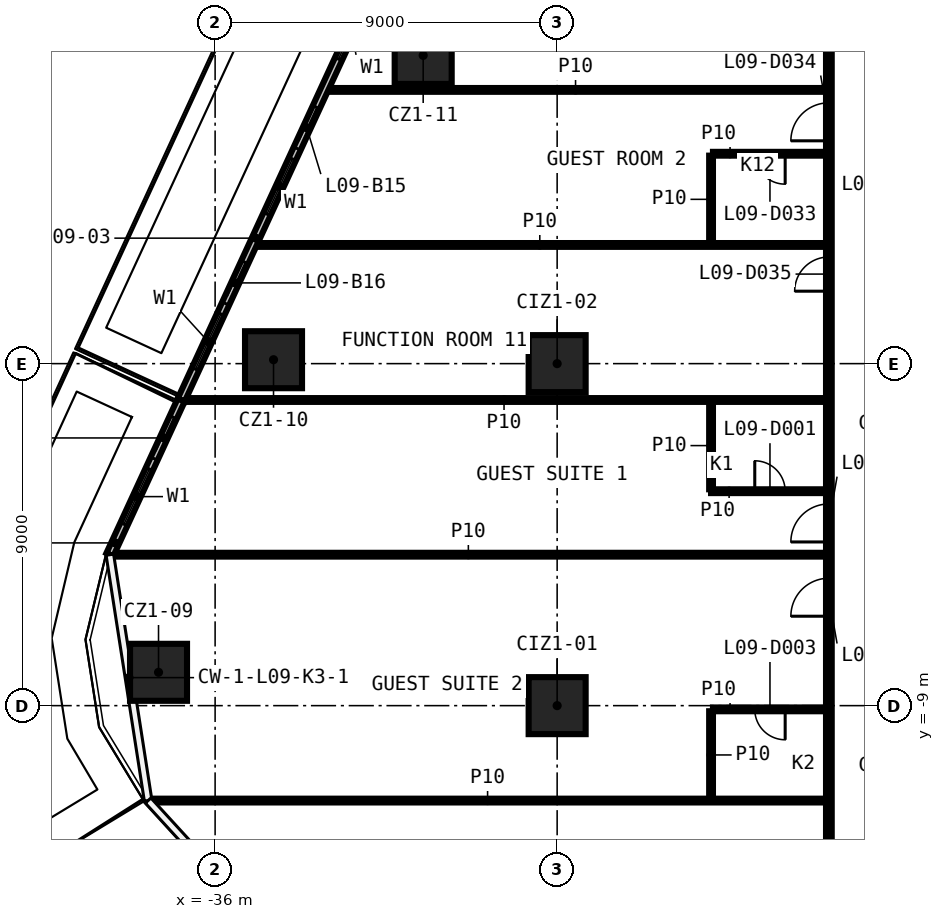
"""IFC4 building model, lengths in metres.
Left out: names, types, materials, properties, quantities, classifications, styles, units other than length and angle.
Written with IfcOpenShell. Run it as: python <this file> out.ifc"""

import sys

from ifc_helpers import new_model, si_unit, direction, frame, frame_2d, origin, origin_2d, place, context, subcontext, project, spatial, rectangle, extrude, element, fill, save


model = new_model("IFC4")
c1 = context("Model", 3, precision=1e-05, world=origin(), true_north=direction((0.0, 1.0)))
c2 = subcontext(c1, "Body", "Model", "MODEL_VIEW")
j1 = project(units=[si_unit("LENGTHUNIT", "METRE"), si_unit("PLANEANGLEUNIT", "RADIAN")], contexts=[c1])
p1 = place(None, origin())
s1 = spatial("IfcSite", under=j1, at=p1, CompositionType="ELEMENT")
p2 = place(p1, origin())
s2 = spatial("IfcBuilding", under=s1, at=p2, CompositionType="ELEMENT")
p3 = place(p2, frame((0.0, 0.0, 55.1)))
s3 = spatial("IfcBuildingStorey", under=s2, at=p3, CompositionType="ELEMENT", Elevation=55.1)
for number, where, z_axis, x_axis in (
    (1, (-37.489, -8.123, 0.0), (0.0, 0.0, 1.0), (1.0, 0.0, 0.0)),
    (2, (-34.463, 0.103, 0.0), (0.0, 0.0, 1.0), (1.0, 0.0, 0.0)),
    (3, (-30.525, 8.111, 0.0), (0.0, 0.0, 1.0), (1.0, 0.0, 0.0)),
    (4, (-27.0, -9.0, 0.0), (0.0, 0.0, 1.0), (1.0, 0.0, 0.0)),
    (5, (-27.0, 0.0, 0.0), (0.0, 0.0, 1.0), (1.0, 0.0, 0.0)),
):
    element("IfcColumn", number, at=place(p3, frame(where, z_axis=z_axis, x_axis=x_axis)), inside=s3, PredefinedType="COLUMN", context=c2, shape_type="SweptSolid", body=[
        extrude(rectangle(XDim=1.5, YDim=1.5, at=origin_2d()), origin(), (0.0, 0.0, 1.0), 3.3),
    ])
p4 = place(p3, frame((-37.736, -11.498, 0.0), z_axis=(0.0, 0.0, 1.0), x_axis=(1.0, 0.0, 0.0)))
e6 = element("IfcWall", 6, at=p4, inside=s3, PredefinedType="PARTITIONING", context=c2, shape_type="SweptSolid", body=[
    extrude(rectangle(XDim=17.811, YDim=0.1, at=frame_2d((8.905, 0.0))), origin(), (0.0, 0.0, 1.0), 3.3),
])
p5 = place(p3, frame((-19.925, -9.098, 0.0), z_axis=(0.0, 0.0, 1.0), x_axis=(-1.0, 0.0, 0.0)))
e7 = element("IfcWall", 7, at=p5, inside=s3, PredefinedType="PARTITIONING", context=c2, shape_type="SweptSolid", body=[
    extrude(rectangle(XDim=2.975, YDim=0.1, at=frame_2d((1.487, 0.0))), origin(), (0.0, 0.0, 1.0), 3.3),
])
p6 = place(p5, frame((1.075, 0.0, 0.0)))
e8 = element("IfcOpeningElement", 8, at=p6, cuts=e7, PredefinedType="OPENING", context=c2, shape_type="SweptSolid", body=[
    extrude(rectangle(XDim=0.8, YDim=2.1, at=frame_2d((0.4, 1.05))), frame((0.0, 0.06, 0.0), z_axis=(0.0, -1.0, 0.0), x_axis=(1.0, 0.0, 0.0)), (0.0, 0.0, 1.0), 0.12),
])
p7 = place(p3, frame((-38.748, -5.028, 0.0), z_axis=(0.0, 0.0, 1.0), x_axis=(1.0, 0.0, 0.0)))
e9 = element("IfcWall", 9, at=p7, inside=s3, PredefinedType="PARTITIONING", context=c2, shape_type="SweptSolid", body=[
    extrude(rectangle(XDim=18.823, YDim=0.1, at=frame_2d((9.411, 0.0))), origin(), (0.0, 0.0, 1.0), 3.3),
])
p8 = place(p3, frame((-22.95, -3.357, 0.0), z_axis=(0.0, 0.0, 1.0), x_axis=(1.0, 0.0, 0.0)))
e10 = element("IfcWall", 10, at=p8, inside=s3, PredefinedType="PARTITIONING", context=c2, shape_type="SweptSolid", body=[
    extrude(rectangle(XDim=3.025, YDim=0.1, at=frame_2d((1.512, 0.0))), origin(), (0.0, 0.0, 1.0), 3.3),
])
p9 = place(p8, frame((1.15, 0.0, 0.0)))
e11 = element("IfcOpeningElement", 11, at=p9, cuts=e10, PredefinedType="OPENING", context=c2, shape_type="SweptSolid", body=[
    extrude(rectangle(XDim=0.8, YDim=2.1, at=frame_2d((0.4, 1.05))), frame((0.0, 0.06, 0.0), z_axis=(0.0, -1.0, 0.0), x_axis=(1.0, 0.0, 0.0)), (0.0, 0.0, 1.0), 0.12),
])
p10 = place(p3, frame((-36.87, -0.957, 0.0), z_axis=(0.0, 0.0, 1.0), x_axis=(1.0, 0.0, 0.0)))
e12 = element("IfcWall", 12, at=p10, inside=s3, PredefinedType="PARTITIONING", context=c2, shape_type="SweptSolid", body=[
    extrude(rectangle(XDim=16.945, YDim=0.1, at=frame_2d((8.472, 0.0))), origin(), (0.0, 0.0, 1.0), 3.3),
])
p11 = place(p3, frame((-34.988, 3.123, 0.0), z_axis=(0.0, 0.0, 1.0), x_axis=(1.0, 0.0, 0.0)))
e13 = element("IfcWall", 13, at=p11, inside=s3, PredefinedType="PARTITIONING", context=c2, shape_type="SweptSolid", body=[
    extrude(rectangle(XDim=15.063, YDim=0.1, at=frame_2d((7.531, 0.0))), origin(), (0.0, 0.0, 1.0), 3.3),
])
p12 = place(p3, frame((-19.925, 5.523, 0.0), z_axis=(0.0, 0.0, 1.0), x_axis=(-1.0, 0.0, 0.0)))
e14 = element("IfcWall", 14, at=p12, inside=s3, PredefinedType="PARTITIONING", context=c2, shape_type="SweptSolid", body=[
    extrude(rectangle(XDim=2.975, YDim=0.1, at=frame_2d((1.487, 0.0))), origin(), (0.0, 0.0, 1.0), 3.3),
])
p13 = place(p12, frame((1.075, 0.0, 0.0)))
e15 = element("IfcOpeningElement", 15, at=p13, cuts=e14, PredefinedType="OPENING", context=c2, shape_type="SweptSolid", body=[
    extrude(rectangle(XDim=0.8, YDim=2.1, at=frame_2d((0.4, 1.05))), frame((0.0, 0.06, 0.0), z_axis=(0.0, -1.0, 0.0), x_axis=(1.0, 0.0, 0.0)), (0.0, 0.0, 1.0), 0.12),
])
p14 = place(p3, frame((-33.106, 7.203, 0.0), z_axis=(0.0, 0.0, 1.0), x_axis=(1.0, 0.0, 0.0)))
e16 = element("IfcWall", 16, at=p14, inside=s3, PredefinedType="PARTITIONING", context=c2, shape_type="SweptSolid", body=[
    extrude(rectangle(XDim=13.181, YDim=0.1, at=frame_2d((6.591, 0.0))), origin(), (0.0, 0.0, 1.0), 3.3),
])
p15 = place(p3, frame((-19.85, -16.775, 0.0), z_axis=(0.0, 0.0, 1.0), x_axis=(0.0, 1.0, 0.0)))
e17 = element("IfcWall", 17, at=p15, inside=s3, PredefinedType="PARTITIONING", context=c2, shape_type="SweptSolid", body=[
    extrude(rectangle(XDim=33.55, YDim=0.15, at=frame_2d((16.775, 0.0))), origin(), (0.0, 0.0, 1.0), 3.3),
])
p16 = place(p15, frame((12.083, 0.0, 0.0)))
e18 = element("IfcOpeningElement", 18, at=p16, cuts=e17, PredefinedType="OPENING", context=c2, shape_type="SweptSolid", body=[
    extrude(rectangle(XDim=1.0, YDim=2.1, at=frame_2d((0.5, 1.05))), frame((0.0, 0.085, 0.0), z_axis=(0.0, -1.0, 0.0), x_axis=(1.0, 0.0, 0.0)), (0.0, 0.0, 1.0), 0.17),
])
p17 = place(p15, frame((10.128, 0.0, 0.0)))
e19 = element("IfcOpeningElement", 19, at=p17, cuts=e17, PredefinedType="OPENING", context=c2, shape_type="SweptSolid", body=[
    extrude(rectangle(XDim=1.0, YDim=2.1, at=frame_2d((0.5, 1.05))), frame((0.0, 0.085, 0.0), z_axis=(0.0, -1.0, 0.0), x_axis=(1.0, 0.0, 0.0)), (0.0, 0.0, 1.0), 0.17),
])
p18 = place(p15, frame((3.259, 0.0, 0.0)))
e20 = element("IfcOpeningElement", 20, at=p18, cuts=e17, PredefinedType="OPENING", context=c2, shape_type="SweptSolid", body=[
    extrude(rectangle(XDim=0.9, YDim=2.1, at=frame_2d((0.45, 1.05))), frame((0.0, 0.085, 0.0), z_axis=(0.0, -1.0, 0.0), x_axis=(1.0, 0.0, 0.0)), (0.0, 0.0, 1.0), 0.17),
])
p19 = place(p15, frame((30.799, 0.0, 0.0)))
e21 = element("IfcOpeningElement", 21, at=p19, cuts=e17, PredefinedType="OPENING", context=c2, shape_type="SweptSolid", body=[
    extrude(rectangle(XDim=1.0, YDim=2.1, at=frame_2d((0.5, 1.05))), frame((0.0, 0.085, 0.0), z_axis=(0.0, -1.0, 0.0), x_axis=(1.0, 0.0, 0.0)), (0.0, 0.0, 1.0), 0.17),
])
p20 = place(p15, frame((22.638, 0.0, 0.0)))
e22 = element("IfcOpeningElement", 22, at=p20, cuts=e17, PredefinedType="OPENING", context=c2, shape_type="SweptSolid", body=[
    extrude(rectangle(XDim=1.0, YDim=2.1, at=frame_2d((0.5, 1.05))), frame((0.0, 0.085, 0.0), z_axis=(0.0, -1.0, 0.0), x_axis=(1.0, 0.0, 0.0)), (0.0, 0.0, 1.0), 0.17),
])
p21 = place(p15, frame((18.681, 0.0, 0.0)))
e23 = element("IfcOpeningElement", 23, at=p21, cuts=e17, PredefinedType="OPENING", context=c2, shape_type="SweptSolid", body=[
    extrude(rectangle(XDim=0.9, YDim=2.1, at=frame_2d((0.45, 1.05))), frame((0.0, 0.085, 0.0), z_axis=(0.0, -1.0, 0.0), x_axis=(1.0, 0.0, 0.0)), (0.0, 0.0, 1.0), 0.17),
])
for number, where, z_axis, x_axis in (
    (24, (-22.95, -11.448, 0.0), (0.0, 0.0, 1.0), (0.0, 1.0, 0.0)),
    (25, (-22.95, -3.307, 0.0), (0.0, 0.0, 1.0), (0.0, 1.0, 0.0)),
):
    element("IfcWall", number, at=place(p3, frame(where, z_axis=z_axis, x_axis=x_axis)), inside=s3, PredefinedType="PARTITIONING", context=c2, shape_type="SweptSolid", body=[
        extrude(rectangle(XDim=2.3, YDim=0.1, at=frame_2d((1.15, 0.0))), origin(), (0.0, 0.0, 1.0), 3.3),
    ])
p22 = place(p3, frame((-22.95, 3.173, 0.0), z_axis=(0.0, 0.0, 1.0), x_axis=(0.0, 1.0, 0.0)))
e26 = element("IfcWall", 26, at=p22, inside=s3, PredefinedType="PARTITIONING", context=c2, shape_type="SweptSolid", body=[
    extrude(rectangle(XDim=2.3, YDim=0.1, at=frame_2d((1.15, 0.0))), origin(), (0.0, 0.0, 1.0), 3.3),
])
p23 = place(p3, frame((-25.601, 23.524, 0.0), z_axis=(0.0, 0.0, 1.0), x_axis=(-0.418809499218, -0.908074117771, 0.0)))
e27 = element("IfcWall", 27, at=p23, inside=s3, PredefinedType="SOLIDWALL", context=c2, shape_type="SweptSolid", body=[
    extrude(rectangle(XDim=26.959, YDim=0.2, at=frame_2d((13.479, 0.0))), origin(), (0.0, 0.0, 1.0), 3.3),
])
p24 = place(p23, frame((2.0, 0.0, 0.6)))
e28 = element("IfcOpeningElement", 28, at=p24, cuts=e27, PredefinedType="OPENING", context=c2, shape_type="SweptSolid", body=[
    extrude(rectangle(XDim=1.6, YDim=2.4, at=frame_2d((0.8, 1.2))), frame((0.0, 0.11, 0.0), z_axis=(0.0, -1.0, 0.0), x_axis=(1.0, 0.0, 0.0)), (0.0, 0.0, 1.0), 0.22),
])
p25 = place(p23, frame((0.5, 0.0, 0.0)))
e29 = element("IfcOpeningElement", 29, at=p25, cuts=e27, PredefinedType="OPENING", context=c2, shape_type="SweptSolid", body=[
    extrude(rectangle(XDim=1.2, YDim=2.4, at=frame_2d((0.6, 1.2))), frame((0.0, 0.11, 0.0), z_axis=(0.0, -1.0, 0.0), x_axis=(1.0, 0.0, 0.0)), (0.0, 0.0, 1.0), 0.22),
])
p26 = place(p23, frame((6.493, 0.0, 0.6)))
e30 = element("IfcOpeningElement", 30, at=p26, cuts=e27, PredefinedType="OPENING", context=c2, shape_type="SweptSolid", body=[
    extrude(rectangle(XDim=1.6, YDim=2.4, at=frame_2d((0.8, 1.2))), frame((0.0, 0.11, 0.0), z_axis=(0.0, -1.0, 0.0), x_axis=(1.0, 0.0, 0.0)), (0.0, 0.0, 1.0), 0.22),
])
p27 = place(p23, frame((4.993, 0.0, 0.0)))
e31 = element("IfcOpeningElement", 31, at=p27, cuts=e27, PredefinedType="OPENING", context=c2, shape_type="SweptSolid", body=[
    extrude(rectangle(XDim=1.2, YDim=2.4, at=frame_2d((0.6, 1.2))), frame((0.0, 0.11, 0.0), z_axis=(0.0, -1.0, 0.0), x_axis=(1.0, 0.0, 0.0)), (0.0, 0.0, 1.0), 0.22),
])
p28 = place(p23, frame((10.987, 0.0, 0.6)))
e32 = element("IfcOpeningElement", 32, at=p28, cuts=e27, PredefinedType="OPENING", context=c2, shape_type="SweptSolid", body=[
    extrude(rectangle(XDim=1.6, YDim=2.4, at=frame_2d((0.8, 1.2))), frame((0.0, 0.11, 0.0), z_axis=(0.0, -1.0, 0.0), x_axis=(1.0, 0.0, 0.0)), (0.0, 0.0, 1.0), 0.22),
])
p29 = place(p23, frame((9.487, 0.0, 0.0)))
e33 = element("IfcOpeningElement", 33, at=p29, cuts=e27, PredefinedType="OPENING", context=c2, shape_type="SweptSolid", body=[
    extrude(rectangle(XDim=1.2, YDim=2.4, at=frame_2d((0.6, 1.2))), frame((0.0, 0.11, 0.0), z_axis=(0.0, -1.0, 0.0), x_axis=(1.0, 0.0, 0.0)), (0.0, 0.0, 1.0), 0.22),
])
p30 = place(p23, frame((15.48, 0.0, 0.6)))
e34 = element("IfcOpeningElement", 34, at=p30, cuts=e27, PredefinedType="OPENING", context=c2, shape_type="SweptSolid", body=[
    extrude(rectangle(XDim=1.6, YDim=2.4, at=frame_2d((0.8, 1.2))), frame((0.0, 0.11, 0.0), z_axis=(0.0, -1.0, 0.0), x_axis=(1.0, 0.0, 0.0)), (0.0, 0.0, 1.0), 0.22),
])
p31 = place(p23, frame((13.98, 0.0, 0.0)))
e35 = element("IfcOpeningElement", 35, at=p31, cuts=e27, PredefinedType="OPENING", context=c2, shape_type="SweptSolid", body=[
    extrude(rectangle(XDim=1.2, YDim=2.4, at=frame_2d((0.6, 1.2))), frame((0.0, 0.11, 0.0), z_axis=(0.0, -1.0, 0.0), x_axis=(1.0, 0.0, 0.0)), (0.0, 0.0, 1.0), 0.22),
])
p32 = place(p23, frame((19.973, 0.0, 0.6)))
e36 = element("IfcOpeningElement", 36, at=p32, cuts=e27, PredefinedType="OPENING", context=c2, shape_type="SweptSolid", body=[
    extrude(rectangle(XDim=1.6, YDim=2.4, at=frame_2d((0.8, 1.2))), frame((0.0, 0.11, 0.0), z_axis=(0.0, -1.0, 0.0), x_axis=(1.0, 0.0, 0.0)), (0.0, 0.0, 1.0), 0.22),
])
p33 = place(p23, frame((18.473, 0.0, 0.0)))
e37 = element("IfcOpeningElement", 37, at=p33, cuts=e27, PredefinedType="OPENING", context=c2, shape_type="SweptSolid", body=[
    extrude(rectangle(XDim=1.2, YDim=2.4, at=frame_2d((0.6, 1.2))), frame((0.0, 0.11, 0.0), z_axis=(0.0, -1.0, 0.0), x_axis=(1.0, 0.0, 0.0)), (0.0, 0.0, 1.0), 0.22),
])
p34 = place(p23, frame((24.466, 0.0, 0.6)))
e38 = element("IfcOpeningElement", 38, at=p34, cuts=e27, PredefinedType="OPENING", context=c2, shape_type="SweptSolid", body=[
    extrude(rectangle(XDim=1.6, YDim=2.4, at=frame_2d((0.8, 1.2))), frame((0.0, 0.11, 0.0), z_axis=(0.0, -1.0, 0.0), x_axis=(1.0, 0.0, 0.0)), (0.0, 0.0, 1.0), 0.22),
])
p35 = place(p23, frame((22.966, 0.0, 0.0)))
e39 = element("IfcOpeningElement", 39, at=p35, cuts=e27, PredefinedType="OPENING", context=c2, shape_type="SweptSolid", body=[
    extrude(rectangle(XDim=1.2, YDim=2.4, at=frame_2d((0.6, 1.2))), frame((0.0, 0.11, 0.0), z_axis=(0.0, -1.0, 0.0), x_axis=(1.0, 0.0, 0.0)), (0.0, 0.0, 1.0), 0.22),
])
p36 = place(p3, frame((-36.892, -0.957, 0.0), z_axis=(0.0, 0.0, 1.0), x_axis=(-0.418806078916, -0.908075695228, 0.0)))
e40 = element("IfcWall", 40, at=p36, inside=s3, PredefinedType="SOLIDWALL", context=c2, shape_type="SweptSolid", body=[
    extrude(rectangle(XDim=4.483, YDim=0.2, at=frame_2d((2.242, 0.0))), origin(), (0.0, 0.0, 1.0), 3.3),
])
p37 = place(p36, frame((2.0, 0.0, 0.6)))
e41 = element("IfcOpeningElement", 41, at=p37, cuts=e40, PredefinedType="OPENING", context=c2, shape_type="SweptSolid", body=[
    extrude(rectangle(XDim=1.6, YDim=2.4, at=frame_2d((0.8, 1.2))), frame((0.0, 0.11, 0.0), z_axis=(0.0, -1.0, 0.0), x_axis=(1.0, 0.0, 0.0)), (0.0, 0.0, 1.0), 0.22),
])
p38 = place(p36, frame((0.5, 0.0, 0.0)))
e42 = element("IfcOpeningElement", 42, at=p38, cuts=e40, PredefinedType="OPENING", context=c2, shape_type="SweptSolid", body=[
    extrude(rectangle(XDim=1.2, YDim=2.4, at=frame_2d((0.6, 1.2))), frame((0.0, 0.11, 0.0), z_axis=(0.0, -1.0, 0.0), x_axis=(1.0, 0.0, 0.0)), (0.0, 0.0, 1.0), 0.22),
])
p39 = place(p9, origin())
e43 = element("IfcDoor", 43, at=p39, inside=s3, OperationType="SINGLE_SWING_LEFT", PredefinedType="DOOR", context=c2, shape_type="SweptSolid", body=[
    extrude(rectangle(XDim=0.8, YDim=2.1, at=frame_2d((0.4, 1.05))), frame((0.0, 0.025, 0.0), z_axis=(0.0, -1.0, 0.0), x_axis=(1.0, 0.0, 0.0)), (0.0, 0.0, 1.0), 0.05),
])
fill(e11, e43)
p40 = place(p16, origin())
e44 = element("IfcDoor", 44, at=p40, inside=s3, OperationType="SINGLE_SWING_RIGHT", PredefinedType="DOOR", context=c2, shape_type="SweptSolid", body=[
    extrude(rectangle(XDim=1.0, YDim=2.1, at=frame_2d((0.5, 1.05))), frame((0.0, 0.025, 0.0), z_axis=(0.0, -1.0, 0.0), x_axis=(1.0, 0.0, 0.0)), (0.0, 0.0, 1.0), 0.05),
])
fill(e18, e44)
p41 = place(p6, origin())
e45 = element("IfcDoor", 45, at=p41, inside=s3, OperationType="SINGLE_SWING_RIGHT", PredefinedType="DOOR", context=c2, shape_type="SweptSolid", body=[
    extrude(rectangle(XDim=0.8, YDim=2.1, at=frame_2d((0.4, 1.05))), frame((0.0, 0.025, 0.0), z_axis=(0.0, -1.0, 0.0), x_axis=(1.0, 0.0, 0.0)), (0.0, 0.0, 1.0), 0.05),
])
fill(e8, e45)
p42 = place(p17, origin())
e46 = element("IfcDoor", 46, at=p42, inside=s3, OperationType="SINGLE_SWING_LEFT", PredefinedType="DOOR", context=c2, shape_type="SweptSolid", body=[
    extrude(rectangle(XDim=1.0, YDim=2.1, at=frame_2d((0.5, 1.05))), frame((0.0, 0.025, 0.0), z_axis=(0.0, -1.0, 0.0), x_axis=(1.0, 0.0, 0.0)), (0.0, 0.0, 1.0), 0.05),
])
fill(e19, e46)
p43 = place(p13, origin())
e47 = element("IfcDoor", 47, at=p43, inside=s3, OperationType="SINGLE_SWING_RIGHT", PredefinedType="DOOR", context=c2, shape_type="SweptSolid", body=[
    extrude(rectangle(XDim=0.8, YDim=2.1, at=frame_2d((0.4, 1.05))), frame((0.0, 0.025, 0.0), z_axis=(0.0, -1.0, 0.0), x_axis=(1.0, 0.0, 0.0)), (0.0, 0.0, 1.0), 0.05),
])
fill(e15, e47)
p44 = place(p20, origin())
e48 = element("IfcDoor", 48, at=p44, inside=s3, OperationType="SINGLE_SWING_LEFT", PredefinedType="DOOR", context=c2, shape_type="SweptSolid", body=[
    extrude(rectangle(XDim=1.0, YDim=2.1, at=frame_2d((0.5, 1.05))), frame((0.0, 0.025, 0.0), z_axis=(0.0, -1.0, 0.0), x_axis=(1.0, 0.0, 0.0)), (0.0, 0.0, 1.0), 0.05),
])
fill(e22, e48)
p45 = place(p21, origin())
e49 = element("IfcDoor", 49, at=p45, inside=s3, OperationType="SINGLE_SWING_RIGHT", PredefinedType="DOOR", context=c2, shape_type="SweptSolid", body=[
    extrude(rectangle(XDim=0.9, YDim=2.1, at=frame_2d((0.45, 1.05))), frame((0.0, 0.025, 0.0), z_axis=(0.0, -1.0, 0.0), x_axis=(1.0, 0.0, 0.0)), (0.0, 0.0, 1.0), 0.05),
])
fill(e23, e49)
p46 = place(p30, origin())
e50 = element("IfcWindow", 50, at=p46, inside=s3, PartitioningType="SINGLE_PANEL", PredefinedType="WINDOW", context=c2, shape_type="SweptSolid", body=[
    extrude(rectangle(XDim=1.6, YDim=2.4, at=frame_2d((0.8, 1.2))), frame((0.0, 0.03, 0.0), z_axis=(0.0, -1.0, 0.0), x_axis=(1.0, 0.0, 0.0)), (0.0, 0.0, 1.0), 0.06),
])
fill(e34, e50)
p47 = place(p32, origin())
e51 = element("IfcWindow", 51, at=p47, inside=s3, PartitioningType="SINGLE_PANEL", PredefinedType="WINDOW", context=c2, shape_type="SweptSolid", body=[
    extrude(rectangle(XDim=1.6, YDim=2.4, at=frame_2d((0.8, 1.2))), frame((0.0, 0.03, 0.0), z_axis=(0.0, -1.0, 0.0), x_axis=(1.0, 0.0, 0.0)), (0.0, 0.0, 1.0), 0.06),
])
fill(e36, e51)
p48 = place(p33, origin())
e52 = element("IfcDoor", 52, at=p48, inside=s3, OperationType="SLIDING_TO_LEFT", PredefinedType="DOOR", context=c2, shape_type="SweptSolid", body=[
    extrude(rectangle(XDim=1.2, YDim=2.4, at=frame_2d((0.6, 1.2))), frame((0.0, 0.025, 0.0), z_axis=(0.0, -1.0, 0.0), x_axis=(1.0, 0.0, 0.0)), (0.0, 0.0, 1.0), 0.05),
])
fill(e37, e52)
p49 = place(p34, origin())
e53 = element("IfcWindow", 53, at=p49, inside=s3, PartitioningType="SINGLE_PANEL", PredefinedType="WINDOW", context=c2, shape_type="SweptSolid", body=[
    extrude(rectangle(XDim=1.6, YDim=2.4, at=frame_2d((0.8, 1.2))), frame((0.0, 0.03, 0.0), z_axis=(0.0, -1.0, 0.0), x_axis=(1.0, 0.0, 0.0)), (0.0, 0.0, 1.0), 0.06),
])
fill(e38, e53)
p50 = place(p35, origin())
e54 = element("IfcDoor", 54, at=p50, inside=s3, OperationType="SLIDING_TO_LEFT", PredefinedType="DOOR", context=c2, shape_type="SweptSolid", body=[
    extrude(rectangle(XDim=1.2, YDim=2.4, at=frame_2d((0.6, 1.2))), frame((0.0, 0.025, 0.0), z_axis=(0.0, -1.0, 0.0), x_axis=(1.0, 0.0, 0.0)), (0.0, 0.0, 1.0), 0.05),
])
fill(e39, e54)
p51 = place(p37, origin())
e55 = element("IfcWindow", 55, at=p51, inside=s3, PartitioningType="SINGLE_PANEL", PredefinedType="WINDOW", context=c2, shape_type="SweptSolid", body=[
    extrude(rectangle(XDim=1.6, YDim=2.4, at=frame_2d((0.8, 1.2))), frame((0.0, 0.03, 0.0), z_axis=(0.0, -1.0, 0.0), x_axis=(1.0, 0.0, 0.0)), (0.0, 0.0, 1.0), 0.06),
])
fill(e41, e55)
p52 = place(p38, origin())
e56 = element("IfcDoor", 56, at=p52, inside=s3, OperationType="SLIDING_TO_LEFT", PredefinedType="DOOR", context=c2, shape_type="SweptSolid", body=[
    extrude(rectangle(XDim=1.2, YDim=2.4, at=frame_2d((0.6, 1.2))), frame((0.0, 0.025, 0.0), z_axis=(0.0, -1.0, 0.0), x_axis=(1.0, 0.0, 0.0)), (0.0, 0.0, 1.0), 0.05),
])
fill(e42, e56)
save(model, sys.argv[1])
